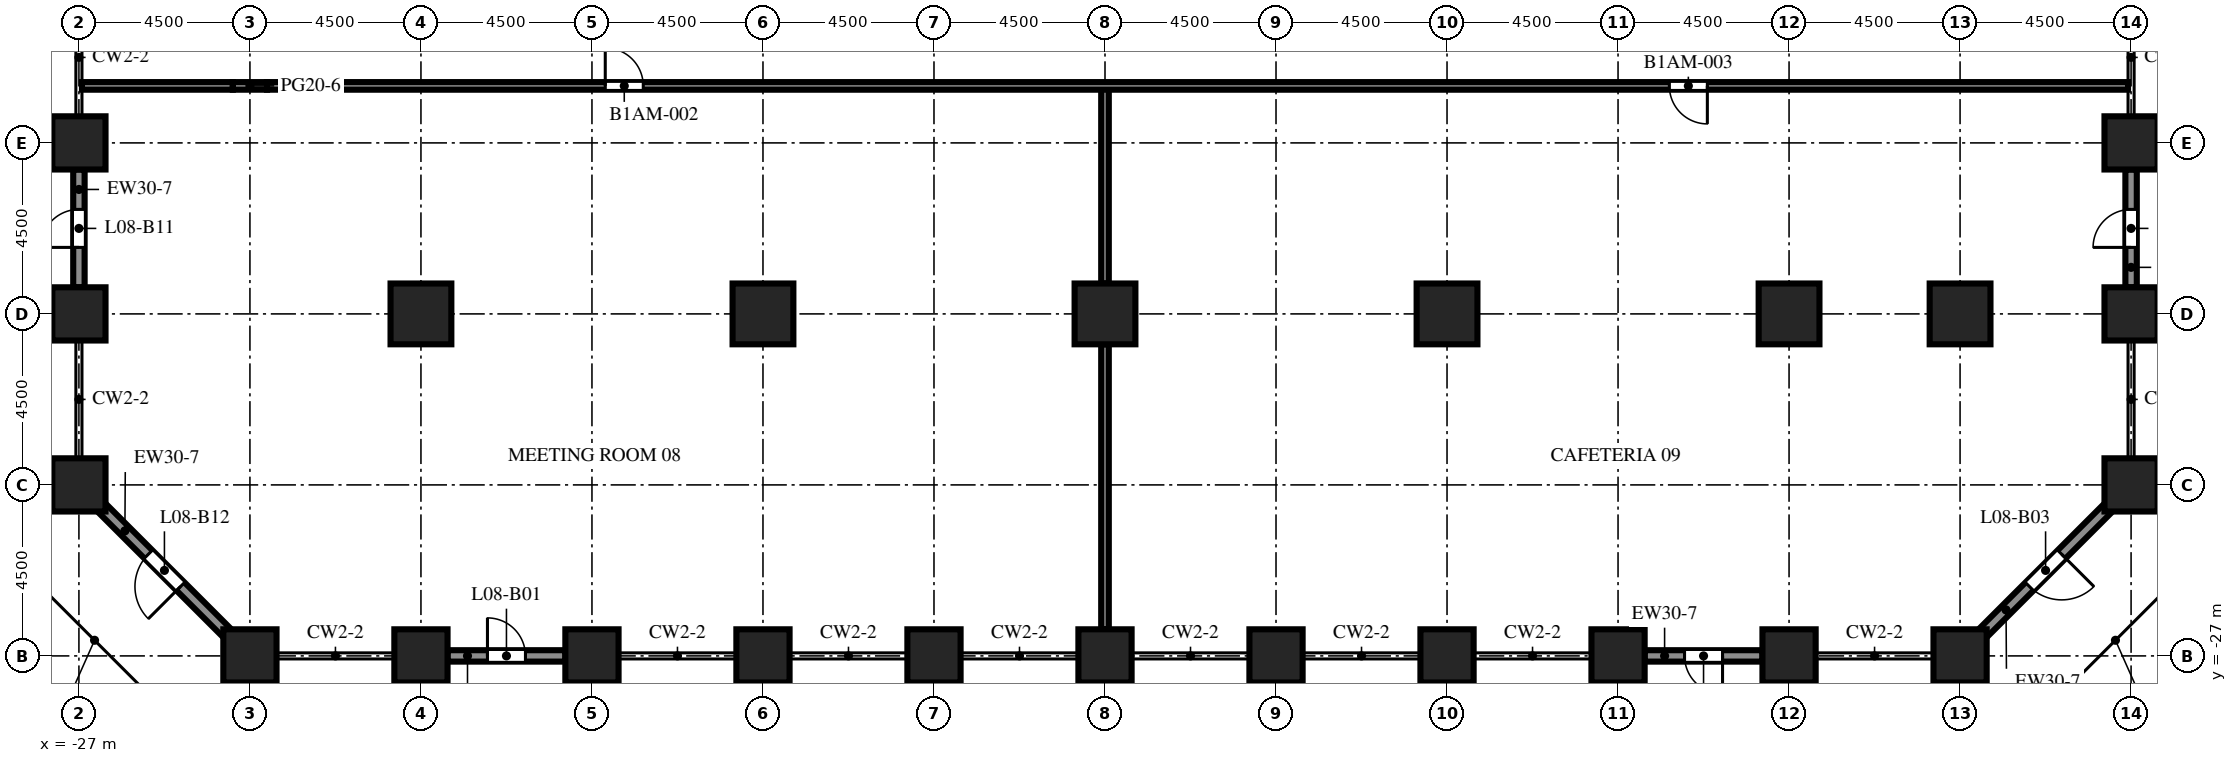
"""IFC4 building model, lengths in metres.
Left out: names, types, materials, properties, quantities, classifications, styles, units other than length and angle.
Written with IfcOpenShell. Run it as: python <this file> out.ifc"""

import sys

from ifc_helpers import new_model, si_unit, direction, frame, frame_2d, origin, origin_2d, place, context, subcontext, project, spatial, rectangle, extrude, element, fill, save


model = new_model("IFC4")
c1 = context("Model", 3, precision=1e-05, world=origin(), true_north=direction((0.0, 1.0)))
c2 = subcontext(c1, "Body", "Model", "MODEL_VIEW")
j1 = project(units=[si_unit("LENGTHUNIT", "METRE"), si_unit("PLANEANGLEUNIT", "RADIAN")], contexts=[c1])
p1 = place(None, origin())
s1 = spatial("IfcSite", under=j1, at=p1, CompositionType="ELEMENT")
p2 = place(p1, origin())
s2 = spatial("IfcBuilding", under=s1, at=p2, CompositionType="ELEMENT")
p3 = place(p2, frame((0.0, 0.0, 35.9)))
s3 = spatial("IfcBuildingStorey", under=s2, at=p3, CompositionType="ELEMENT", Elevation=35.9)
p4 = place(p3, frame((-27.0, -22.5, 0.0), z_axis=(0.0, 0.0, 1.0), x_axis=(1.0, 0.0, 0.0)))
e1 = element("IfcColumn", 1, at=p4, inside=s3, PredefinedType="COLUMN", context=c2, shape_type="SweptSolid", body=[
    extrude(rectangle(XDim=1.4, YDim=1.4, at=origin_2d()), origin(), (0.0, 0.0, 1.0), 6.0),
])
p5 = place(p3, frame((-27.0, -18.0, 0.0), z_axis=(0.0, 0.0, 1.0), x_axis=(1.0, 0.0, 0.0)))
e2 = element("IfcColumn", 2, at=p5, inside=s3, PredefinedType="COLUMN", context=c2, shape_type="SweptSolid", body=[
    extrude(rectangle(XDim=1.4, YDim=1.4, at=origin_2d()), origin(), (0.0, 0.0, 1.0), 3.75),
])
p6 = place(p3, frame((-27.0, -13.5, 0.0), z_axis=(0.0, 0.0, 1.0), x_axis=(1.0, 0.0, 0.0)))
e3 = element("IfcColumn", 3, at=p6, inside=s3, PredefinedType="COLUMN", context=c2, shape_type="SweptSolid", body=[
    extrude(rectangle(XDim=1.4, YDim=1.4, at=origin_2d()), origin(), (0.0, 0.0, 1.0), 6.0),
])
p7 = place(p3, frame((-22.5, -27.0, 0.0), z_axis=(0.0, 0.0, 1.0), x_axis=(1.0, 0.0, 0.0)))
e4 = element("IfcColumn", 4, at=p7, inside=s3, PredefinedType="COLUMN", context=c2, shape_type="SweptSolid", body=[
    extrude(rectangle(XDim=1.4, YDim=1.4, at=origin_2d()), origin(), (0.0, 0.0, 1.0), 3.75),
])
for number, where, z_axis, x_axis in (
    (5, (-18.0, -27.0, 0.0), (0.0, 0.0, 1.0), (1.0, 0.0, 0.0)),
    (6, (-13.5, -27.0, 0.0), (0.0, 0.0, 1.0), (1.0, 0.0, 0.0)),
    (7, (-9.0, -27.0, 0.0), (0.0, 0.0, 1.0), (1.0, 0.0, 0.0)),
    (8, (-4.5, -27.0, 0.0), (0.0, 0.0, 1.0), (1.0, 0.0, 0.0)),
    (9, (0.0, -27.0, 0.0), (0.0, 0.0, 1.0), (1.0, 0.0, 0.0)),
    (10, (4.5, -27.0, 0.0), (0.0, 0.0, 1.0), (1.0, 0.0, 0.0)),
    (11, (9.0, -27.0, 0.0), (0.0, 0.0, 1.0), (1.0, 0.0, 0.0)),
    (12, (13.5, -27.0, 0.0), (0.0, 0.0, 1.0), (1.0, 0.0, 0.0)),
    (13, (18.0, -27.0, 0.0), (0.0, 0.0, 1.0), (1.0, 0.0, 0.0)),
    (14, (22.5, -27.0, 0.0), (0.0, 0.0, 1.0), (1.0, 0.0, 0.0)),
    (15, (27.0, -22.5, 0.0), (0.0, 0.0, 1.0), (1.0, 0.0, 0.0)),
):
    element("IfcColumn", number, at=place(p3, frame(where, z_axis=z_axis, x_axis=x_axis)), inside=s3, PredefinedType="COLUMN", context=c2, shape_type="SweptSolid", body=[
        extrude(rectangle(XDim=1.4, YDim=1.4, at=origin_2d()), origin(), (0.0, 0.0, 1.0), 6.0),
    ])
p8 = place(p3, frame((27.0, -18.0, 0.0), z_axis=(0.0, 0.0, 1.0), x_axis=(1.0, 0.0, 0.0)))
e16 = element("IfcColumn", 16, at=p8, inside=s3, PredefinedType="COLUMN", context=c2, shape_type="SweptSolid", body=[
    extrude(rectangle(XDim=1.4, YDim=1.4, at=origin_2d()), origin(), (0.0, 0.0, 1.0), 5.55),
])
p9 = place(p3, frame((27.0, -13.5, 0.0), z_axis=(0.0, 0.0, 1.0), x_axis=(1.0, 0.0, 0.0)))
e17 = element("IfcColumn", 17, at=p9, inside=s3, PredefinedType="COLUMN", context=c2, shape_type="SweptSolid", body=[
    extrude(rectangle(XDim=1.4, YDim=1.4, at=origin_2d()), origin(), (0.0, 0.0, 1.0), 6.0),
])
p10 = place(p3, frame((-18.0, -18.0, 0.0), z_axis=(0.0, 0.0, 1.0), x_axis=(1.0, 0.0, 0.0)))
e18 = element("IfcColumn", 18, at=p10, inside=s3, PredefinedType="COLUMN", context=c2, shape_type="SweptSolid", body=[
    extrude(rectangle(XDim=1.6, YDim=1.6, at=origin_2d()), origin(), (0.0, 0.0, 1.0), 5.55),
])
for number, where, z_axis, x_axis in (
    (19, (-9.0, -18.0, 0.0), (0.0, 0.0, 1.0), (1.0, 0.0, 0.0)),
    (20, (0.0, -18.0, 0.0), (0.0, 0.0, 1.0), (1.0, 0.0, 0.0)),
    (21, (9.0, -18.0, 0.0), (0.0, 0.0, 1.0), (1.0, 0.0, 0.0)),
):
    element("IfcColumn", number, at=place(p3, frame(where, z_axis=z_axis, x_axis=x_axis)), inside=s3, PredefinedType="COLUMN", context=c2, shape_type="SweptSolid", body=[
        extrude(rectangle(XDim=1.6, YDim=1.6, at=origin_2d()), origin(), (0.0, 0.0, 1.0), 6.0),
    ])
for number, where, z_axis, x_axis in (
    (22, (18.0, -18.0, 0.0), (0.0, 0.0, 1.0), (1.0, 0.0, 0.0)),
    (23, (22.5, -18.0, 0.0), (0.0, 0.0, 1.0), (1.0, 0.0, 0.0)),
):
    element("IfcColumn", number, at=place(p3, frame(where, z_axis=z_axis, x_axis=x_axis)), inside=s3, PredefinedType="COLUMN", context=c2, shape_type="SweptSolid", body=[
        extrude(rectangle(XDim=1.6, YDim=1.6, at=origin_2d()), origin(), (0.0, 0.0, 1.0), 5.55),
    ])
p11 = place(p3, frame((-14.2, -27.0, 0.0), z_axis=(0.0, 0.0, 1.0), x_axis=(-1.0, 0.0, 0.0)))
e24 = element("IfcWall", 24, at=p11, inside=s3, PredefinedType="SOLIDWALL", context=c2, shape_type="SweptSolid", body=[
    extrude(rectangle(XDim=3.1, YDim=0.3, at=frame_2d((1.55, 0.0))), origin(), (0.0, 0.0, 1.0), 4.65),
])
p12 = place(p11, frame((1.05, 0.0, 0.0)))
e25 = element("IfcOpeningElement", 25, at=p12, cuts=e24, PredefinedType="OPENING", context=c2, shape_type="SweptSolid", body=[
    extrude(rectangle(XDim=1.0, YDim=2.2, at=frame_2d((0.5, 1.1))), frame((0.0, 0.16, 0.0), z_axis=(0.0, -1.0, 0.0), x_axis=(1.0, 0.0, 0.0)), (0.0, 0.0, 1.0), 0.32),
])
p13 = place(p3, frame((17.3, -27.0, 0.0), z_axis=(0.0, 0.0, 1.0), x_axis=(-1.0, 0.0, 0.0)))
e26 = element("IfcWall", 26, at=p13, inside=s3, PredefinedType="SOLIDWALL", context=c2, shape_type="SweptSolid", body=[
    extrude(rectangle(XDim=3.1, YDim=0.3, at=frame_2d((1.55, 0.0))), origin(), (0.0, 0.0, 1.0), 4.65),
])
p14 = place(p13, frame((1.05, 0.0, 0.0)))
e27 = element("IfcOpeningElement", 27, at=p14, cuts=e26, PredefinedType="OPENING", context=c2, shape_type="SweptSolid", body=[
    extrude(rectangle(XDim=1.0, YDim=2.2, at=frame_2d((0.5, 1.1))), frame((0.0, 0.16, 0.0), z_axis=(0.0, -1.0, 0.0), x_axis=(1.0, 0.0, 0.0)), (0.0, 0.0, 1.0), 0.32),
])
p15 = place(p3, frame((26.406, -23.094, 0.0), z_axis=(0.0, 0.0, 1.0), x_axis=(-0.707106781187, -0.707106781187, 0.0)))
e28 = element("IfcWall", 28, at=p15, inside=s3, PredefinedType="SOLIDWALL", context=c2, shape_type="SweptSolid", body=[
    extrude(rectangle(XDim=4.684, YDim=0.3, at=frame_2d((2.342, 0.0))), origin(), (0.0, 0.0, 1.0), 4.65),
])
p16 = place(p15, frame((1.742, 0.0, 0.0)))
e29 = element("IfcOpeningElement", 29, at=p16, cuts=e28, PredefinedType="OPENING", context=c2, shape_type="SweptSolid", body=[
    extrude(rectangle(XDim=1.2, YDim=2.2, at=frame_2d((0.6, 1.1))), frame((0.0, 0.16, 0.0), z_axis=(0.0, -1.0, 0.0), x_axis=(1.0, 0.0, 0.0)), (0.0, 0.0, 1.0), 0.32),
])
p17 = place(p3, frame((27.0, -14.2, 0.0), z_axis=(0.0, 0.0, 1.0), x_axis=(0.0, -1.0, 0.0)))
e30 = element("IfcWall", 30, at=p17, inside=s3, PredefinedType="SOLIDWALL", context=c2, shape_type="SweptSolid", body=[
    extrude(rectangle(XDim=3.1, YDim=0.3, at=frame_2d((1.55, 0.0))), origin(), (0.0, 0.0, 1.0), 4.65),
])
p18 = place(p17, frame((1.05, 0.0, 0.0)))
e31 = element("IfcOpeningElement", 31, at=p18, cuts=e30, PredefinedType="OPENING", context=c2, shape_type="SweptSolid", body=[
    extrude(rectangle(XDim=1.0, YDim=2.2, at=frame_2d((0.5, 1.1))), frame((0.0, 0.16, 0.0), z_axis=(0.0, -1.0, 0.0), x_axis=(1.0, 0.0, 0.0)), (0.0, 0.0, 1.0), 0.32),
])
p19 = place(p3, frame((-27.0, -17.3, 0.0), z_axis=(0.0, 0.0, 1.0), x_axis=(0.0, 1.0, 0.0)))
e32 = element("IfcWall", 32, at=p19, inside=s3, PredefinedType="SOLIDWALL", context=c2, shape_type="SweptSolid", body=[
    extrude(rectangle(XDim=3.1, YDim=0.3, at=frame_2d((1.55, 0.0))), origin(), (0.0, 0.0, 1.0), 4.65),
])
p20 = place(p19, frame((1.05, 0.0, 0.0)))
e33 = element("IfcOpeningElement", 33, at=p20, cuts=e32, PredefinedType="OPENING", context=c2, shape_type="SweptSolid", body=[
    extrude(rectangle(XDim=1.0, YDim=2.2, at=frame_2d((0.5, 1.1))), frame((0.0, 0.16, 0.0), z_axis=(0.0, -1.0, 0.0), x_axis=(1.0, 0.0, 0.0)), (0.0, 0.0, 1.0), 0.32),
])
p21 = place(p3, frame((-23.094, -26.406, 0.0), z_axis=(0.0, 0.0, 1.0), x_axis=(-0.707106781187, 0.707106781187, 0.0)))
e34 = element("IfcWall", 34, at=p21, inside=s3, PredefinedType="SOLIDWALL", context=c2, shape_type="SweptSolid", body=[
    extrude(rectangle(XDim=4.684, YDim=0.3, at=frame_2d((2.342, 0.0))), origin(), (0.0, 0.0, 1.0), 4.65),
])
p22 = place(p21, frame((1.742, 0.0, 0.0)))
e35 = element("IfcOpeningElement", 35, at=p22, cuts=e34, PredefinedType="OPENING", context=c2, shape_type="SweptSolid", body=[
    extrude(rectangle(XDim=1.2, YDim=2.2, at=frame_2d((0.6, 1.1))), frame((0.0, 0.16, 0.0), z_axis=(0.0, -1.0, 0.0), x_axis=(1.0, 0.0, 0.0)), (0.0, 0.0, 1.0), 0.32),
])
p23 = place(p3, frame((0.0, -26.3, 0.0), z_axis=(0.0, 0.0, 1.0), x_axis=(0.0, 1.0, 0.0)))
e36 = element("IfcWall", 36, at=p23, inside=s3, PredefinedType="PARTITIONING", context=c2, shape_type="SweptSolid", body=[
    extrude(rectangle(XDim=7.5, YDim=0.2, at=frame_2d((3.75, 0.0))), origin(), (0.0, 0.0, 1.0), 5.55),
])
p24 = place(p3, frame((0.0, -17.2, 0.0), z_axis=(0.0, 0.0, 1.0), x_axis=(0.0, 1.0, 0.0)))
e37 = element("IfcWall", 37, at=p24, inside=s3, PredefinedType="PARTITIONING", context=c2, shape_type="SweptSolid", body=[
    extrude(rectangle(XDim=5.2, YDim=0.2, at=frame_2d((2.6, 0.0))), origin(), (0.0, 0.0, 1.0), 5.55),
])
p25 = place(p3, frame((-26.92, -12.0, 0.0), z_axis=(0.0, 0.0, 1.0), x_axis=(1.0, 0.0, 0.0)))
e38 = element("IfcWall", 38, at=p25, inside=s3, PredefinedType="PARTITIONING", context=c2, shape_type="SweptSolid", body=[
    extrude(rectangle(XDim=3.97, YDim=0.2, at=frame_2d((1.985, 0.0))), origin(), (0.0, 0.0, 1.0), 5.55),
])
p26 = place(p3, frame((-22.95, -12.0, 0.0), z_axis=(0.0, 0.0, 1.0), x_axis=(1.0, 0.0, 0.0)))
e39 = element("IfcWall", 39, at=p26, inside=s3, PredefinedType="PARTITIONING", context=c2, shape_type="SweptSolid", body=[
    extrude(rectangle(XDim=0.9, YDim=0.2, at=frame_2d((0.45, 0.0))), origin(), (0.0, 0.0, 1.0), 3.72),
])
p27 = place(p3, frame((26.92, -12.0, 0.0), z_axis=(0.0, 0.0, 1.0), x_axis=(-1.0, 0.0, 0.0)))
e40 = element("IfcWall", 40, at=p27, inside=s3, PredefinedType="PARTITIONING", context=c2, shape_type="SweptSolid", body=[
    extrude(rectangle(XDim=48.97, YDim=0.2, at=frame_2d((24.485, 0.0))), origin(), (0.0, 0.0, 1.0), 5.55),
])
p28 = place(p27, frame((39.07, 0.0, 0.0)))
e41 = element("IfcOpeningElement", 41, at=p28, cuts=e40, PredefinedType="OPENING", context=c2, shape_type="SweptSolid", body=[
    extrude(rectangle(XDim=1.0, YDim=2.1, at=frame_2d((0.5, 1.05))), frame((0.0, 0.11, 0.0), z_axis=(0.0, -1.0, 0.0), x_axis=(1.0, 0.0, 0.0)), (0.0, 0.0, 1.0), 0.22),
])
p29 = place(p27, frame((11.07, 0.0, 0.0)))
e42 = element("IfcOpeningElement", 42, at=p29, cuts=e40, PredefinedType="OPENING", context=c2, shape_type="SweptSolid", body=[
    extrude(rectangle(XDim=1.0, YDim=2.1, at=frame_2d((0.5, 1.05))), frame((0.0, 0.11, 0.0), z_axis=(0.0, -1.0, 0.0), x_axis=(1.0, 0.0, 0.0)), (0.0, 0.0, 1.0), 0.22),
])
p30 = place(p12, origin())
e43 = element("IfcDoor", 43, at=p30, inside=s3, OperationType="SINGLE_SWING_RIGHT", PredefinedType="DOOR", context=c2, shape_type="SweptSolid", body=[
    extrude(rectangle(XDim=1.0, YDim=2.2, at=frame_2d((0.5, 1.1))), frame((0.0, 0.025, 0.0), z_axis=(0.0, -1.0, 0.0), x_axis=(1.0, 0.0, 0.0)), (0.0, 0.0, 1.0), 0.05),
])
fill(e25, e43)
p31 = place(p14, origin())
e44 = element("IfcDoor", 44, at=p31, inside=s3, OperationType="SINGLE_SWING_LEFT", PredefinedType="DOOR", context=c2, shape_type="SweptSolid", body=[
    extrude(rectangle(XDim=1.0, YDim=2.2, at=frame_2d((0.5, 1.1))), frame((0.0, 0.025, 0.0), z_axis=(0.0, -1.0, 0.0), x_axis=(1.0, 0.0, 0.0)), (0.0, 0.0, 1.0), 0.05),
])
fill(e27, e44)
p32 = place(p16, origin())
e45 = element("IfcDoor", 45, at=p32, inside=s3, OperationType="SINGLE_SWING_LEFT", PredefinedType="DOOR", context=c2, shape_type="SweptSolid", body=[
    extrude(rectangle(XDim=1.2, YDim=2.2, at=frame_2d((0.6, 1.1))), frame((0.0, 0.025, 0.0), z_axis=(0.0, -1.0, 0.0), x_axis=(1.0, 0.0, 0.0)), (0.0, 0.0, 1.0), 0.05),
])
fill(e29, e45)
p33 = place(p18, origin())
e46 = element("IfcDoor", 46, at=p33, inside=s3, OperationType="SINGLE_SWING_RIGHT", PredefinedType="DOOR", context=c2, shape_type="SweptSolid", body=[
    extrude(rectangle(XDim=1.0, YDim=2.2, at=frame_2d((0.5, 1.1))), frame((0.0, 0.025, 0.0), z_axis=(0.0, -1.0, 0.0), x_axis=(1.0, 0.0, 0.0)), (0.0, 0.0, 1.0), 0.05),
])
fill(e31, e46)
p34 = place(p20, origin())
e47 = element("IfcDoor", 47, at=p34, inside=s3, OperationType="SINGLE_SWING_LEFT", PredefinedType="DOOR", context=c2, shape_type="SweptSolid", body=[
    extrude(rectangle(XDim=1.0, YDim=2.2, at=frame_2d((0.5, 1.1))), frame((0.0, 0.025, 0.0), z_axis=(0.0, -1.0, 0.0), x_axis=(1.0, 0.0, 0.0)), (0.0, 0.0, 1.0), 0.05),
])
fill(e33, e47)
p35 = place(p22, origin())
e48 = element("IfcDoor", 48, at=p35, inside=s3, OperationType="SINGLE_SWING_LEFT", PredefinedType="DOOR", context=c2, shape_type="SweptSolid", body=[
    extrude(rectangle(XDim=1.2, YDim=2.2, at=frame_2d((0.6, 1.1))), frame((0.0, 0.025, 0.0), z_axis=(0.0, -1.0, 0.0), x_axis=(1.0, 0.0, 0.0)), (0.0, 0.0, 1.0), 0.05),
])
fill(e35, e48)
p36 = place(p28, origin())
e49 = element("IfcDoor", 49, at=p36, inside=s3, OperationType="SINGLE_SWING_RIGHT", PredefinedType="DOOR", context=c2, shape_type="SweptSolid", body=[
    extrude(rectangle(XDim=1.0, YDim=2.1, at=frame_2d((0.5, 1.05))), frame((0.0, 0.025, 0.0), z_axis=(0.0, -1.0, 0.0), x_axis=(1.0, 0.0, 0.0)), (0.0, 0.0, 1.0), 0.05),
])
fill(e41, e49)
p37 = place(p29, origin())
e50 = element("IfcDoor", 50, at=p37, inside=s3, OperationType="SINGLE_SWING_LEFT", PredefinedType="DOOR", context=c2, shape_type="SweptSolid", body=[
    extrude(rectangle(XDim=1.0, YDim=2.1, at=frame_2d((0.5, 1.05))), frame((0.0, 0.025, 0.0), z_axis=(0.0, -1.0, 0.0), x_axis=(1.0, 0.0, 0.0)), (0.0, 0.0, 1.0), 0.05),
])
fill(e42, e50)
save(model, sys.argv[1])
